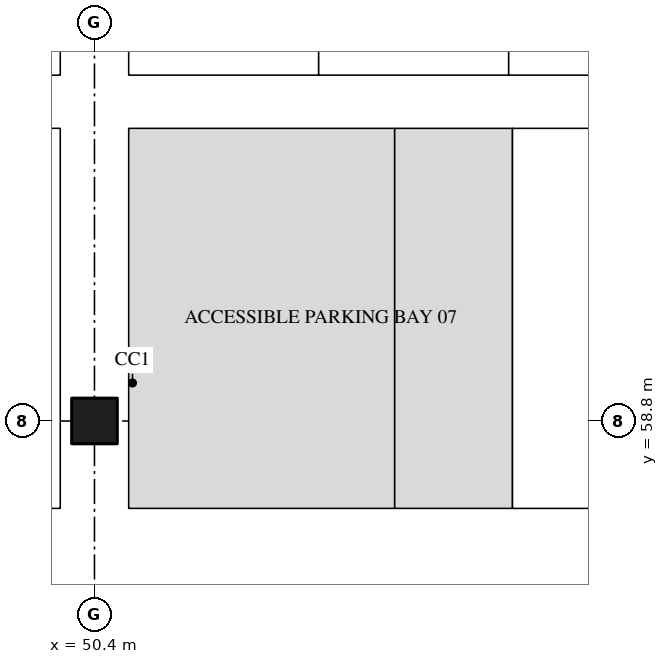
"""IFC4 building model, lengths in metres.
Left out: names, types, materials, properties, quantities, classifications, styles, units other than length and angle.
Written with IfcOpenShell. Run it as: python <this file> out.ifc"""

import sys

from ifc_helpers import new_model, si_unit, direction, frame, origin, origin_2d, place, context, subcontext, project, spatial, rectangle, extrude, element, save


model = new_model("IFC4")
c1 = context("Model", 3, precision=1e-05, world=origin(), true_north=direction((0.0, 1.0)))
c2 = subcontext(c1, "Body", "Model", "MODEL_VIEW")
j1 = project(units=[si_unit("LENGTHUNIT", "METRE"), si_unit("PLANEANGLEUNIT", "RADIAN")], contexts=[c1])
p1 = place(None, origin())
s1 = spatial("IfcSite", under=j1, at=p1, CompositionType="ELEMENT")
p2 = place(p1, origin())
s2 = spatial("IfcBuilding", under=s1, at=p2, CompositionType="ELEMENT")
p3 = place(p2, frame((0.0, 0.0, -4.5)))
s3 = spatial("IfcBuildingStorey", under=s2, at=p3, CompositionType="ELEMENT", Elevation=-4.5)
p4 = place(p3, frame((50.4, 58.8, 0.0), z_axis=(0.0, 0.0, 1.0), x_axis=(1.0, 0.0, 0.0)))
e1 = element("IfcColumn", 1, at=p4, inside=s3, PredefinedType="COLUMN", context=c2, shape_type="SweptSolid", body=[
    extrude(rectangle(XDim=0.6, YDim=0.6, at=origin_2d()), origin(), (0.0, 0.0, 1.0), 4.05),
])
save(model, sys.argv[1])
